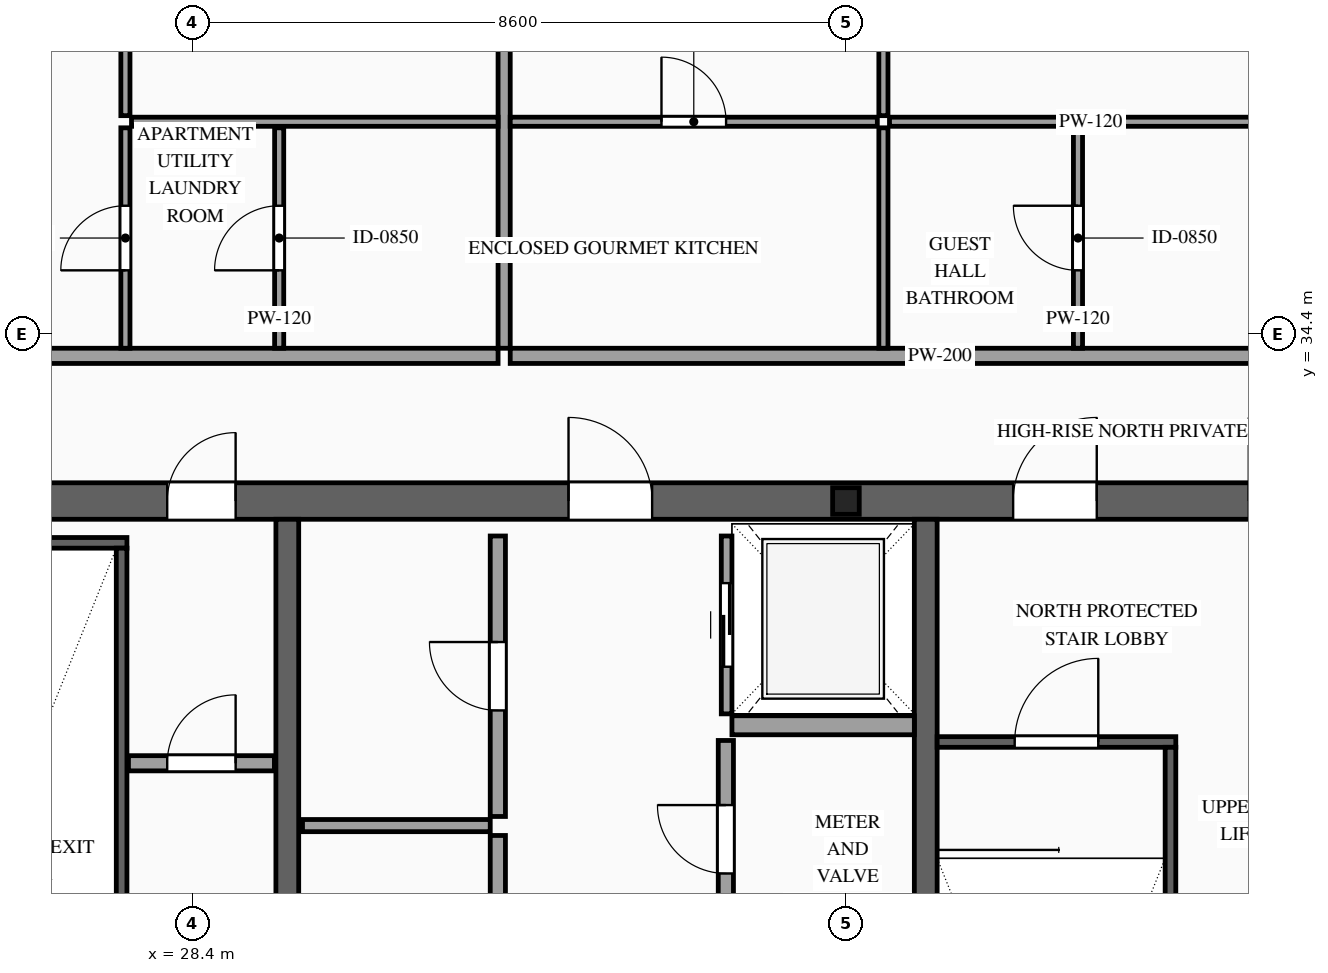
"""IFC4 building model, lengths in metres.
Left out: names, types, materials, properties, quantities, classifications, styles, units other than length and angle.
Written with IfcOpenShell. Run it as: python <this file> out.ifc"""

import sys

from ifc_helpers import new_model, si_unit, direction, frame, frame_2d, origin, origin_2d, place, context, subcontext, project, spatial, rectangle, i_section, extrude, source, transform, mapped, element, fill, save


model = new_model("IFC4")
c1 = context("Model", 3, precision=1e-05, world=origin(), true_north=direction((0.0, 1.0)))
c2 = subcontext(c1, "Body", "Model", "MODEL_VIEW")
j1 = project(units=[si_unit("LENGTHUNIT", "METRE"), si_unit("PLANEANGLEUNIT", "RADIAN")], contexts=[c1])
p1 = place(None, origin())
s1 = spatial("IfcSite", under=j1, at=p1, CompositionType="ELEMENT")
p2 = place(p1, origin())
s2 = spatial("IfcBuilding", under=s1, at=p2, CompositionType="ELEMENT")
p3 = place(p2, frame((0.0, 0.0, 347.2)))
s3 = spatial("IfcBuildingStorey", under=s2, at=p3, CompositionType="ELEMENT", Elevation=347.2)
p4 = place(p3, frame((23.56, 32.2, 0.0), z_axis=(0.0, 0.0, 1.0), x_axis=(1.0, 0.0, 0.0)))
e1 = element("IfcWall", 1, at=p4, inside=s3, PredefinedType="SHEAR", context=c2, shape_type="SweptSolid", body=[
    extrude(rectangle(XDim=26.88, YDim=0.48, at=frame_2d((13.44, 0.0))), origin(), (0.0, 0.0, 1.0), 4.0),
])
p5 = place(p4, frame((4.51, 0.0, 0.0)))
e2 = element("IfcOpeningElement", 2, at=p5, cuts=e1, PredefinedType="OPENING", context=c2, shape_type="SweptSolid", body=[
    extrude(rectangle(XDim=0.9, YDim=2.15, at=frame_2d((0.45, 1.075))), frame((0.0, 0.255, 0.0), z_axis=(0.0, -1.0, 0.0), x_axis=(1.0, 0.0, 0.0)), (0.0, 0.0, 1.0), 0.51),
])
p6 = place(p4, frame((9.79, 0.0, 0.0)))
e3 = element("IfcOpeningElement", 3, at=p6, cuts=e1, PredefinedType="OPENING", context=c2, shape_type="SweptSolid", body=[
    extrude(rectangle(XDim=1.1, YDim=2.2, at=frame_2d((0.55, 1.1))), frame((0.0, 0.255, 0.0), z_axis=(0.0, -1.0, 0.0), x_axis=(1.0, 0.0, 0.0)), (0.0, 0.0, 1.0), 0.51),
])
p7 = place(p4, frame((15.64, 0.0, 0.0)))
e4 = element("IfcOpeningElement", 4, at=p7, cuts=e1, PredefinedType="OPENING", context=c2, shape_type="SweptSolid", body=[
    extrude(rectangle(XDim=1.1, YDim=2.2, at=frame_2d((0.55, 1.1))), frame((0.0, 0.255, 0.0), z_axis=(0.0, -1.0, 0.0), x_axis=(1.0, 0.0, 0.0)), (0.0, 0.0, 1.0), 0.51),
])
p8 = place(p4, frame((18.74, 0.0, 0.0)))
e5 = element("IfcOpeningElement", 5, at=p8, cuts=e1, PredefinedType="OPENING", context=c2, shape_type="SweptSolid", body=[
    extrude(rectangle(XDim=1.1, YDim=2.2, at=frame_2d((0.55, 1.1))), frame((0.0, 0.255, 0.0), z_axis=(0.0, -1.0, 0.0), x_axis=(1.0, 0.0, 0.0)), (0.0, 0.0, 1.0), 0.51),
])
m1 = source(origin(), c2, "Body", "SweptSolid", [
    extrude(rectangle(XDim=12.32, YDim=0.3, at=frame_2d((6.16, 0.0))), origin(), (0.0, 0.0, 1.0), 4.0),
])
for number, where, z_axis, x_axis in (
    (6, (29.65, 19.64, 0.0), (0.0, 0.0, 1.0), (0.0, 1.0, 0.0)),
    (7, (38.05, 19.64, 0.0), (0.0, 0.0, 1.0), (0.0, 1.0, 0.0)),
):
    element("IfcWall", number, at=place(p3, frame(where, z_axis=z_axis, x_axis=x_axis)), inside=s3, PredefinedType="SOLIDWALL", context=c2, shape_type="MappedRepresentation", body=[
        mapped(m1, transform((0.0, 0.0, 0.0), scale=1.0)),
    ])
m2 = source(origin(), c2, "Body", "SweptSolid", [
    extrude(i_section(OverallWidth=0.35, OverallDepth=0.35, WebThickness=0.012, FlangeThickness=0.019, at=origin_2d()), origin(), (0.0, 0.0, 1.0), 4.0),
])
p9 = place(p3, frame((37.0, 32.2, 0.0), z_axis=(0.0, 0.0, 1.0), x_axis=(1.0, 0.0, 0.0)))
e8 = element("IfcColumn", 8, at=p9, inside=s3, PredefinedType="COLUMN", context=c2, shape_type="MappedRepresentation", body=[
    mapped(m2, transform((0.0, 0.0, 0.0), scale=1.0)),
])
p10 = place(p3, frame((35.43, 29.4, 0.0), z_axis=(0.0, 0.0, 1.0), x_axis=(0.0, 1.0, 0.0)))
e9 = element("IfcWall", 9, at=p10, inside=s3, PredefinedType="SOLIDWALL", context=c2, shape_type="SweptSolid", body=[
    extrude(rectangle(XDim=2.34, YDim=0.14, at=frame_2d((1.17, 0.0))), origin(), (0.0, 0.0, 1.0), 3.7),
])
p11 = place(p10, frame((0.62, 0.0, 0.0)))
e10 = element("IfcOpeningElement", 10, at=p11, cuts=e9, PredefinedType="OPENING", context=c2, shape_type="SweptSolid", body=[
    extrude(rectangle(XDim=1.1, YDim=2.2, at=frame_2d((0.55, 1.1))), frame((0.0, 0.085, 0.0), z_axis=(0.0, -1.0, 0.0), x_axis=(1.0, 0.0, 0.0)), (0.0, 0.0, 1.0), 0.17),
])
m3 = source(origin(), c2, "Body", "SweptSolid", [
    extrude(rectangle(XDim=2.4, YDim=0.25, at=frame_2d((1.2, 0.0))), origin(), (0.0, 0.0, 1.0), 3.7),
])
p12 = place(p3, frame((35.5, 29.25, 0.0), z_axis=(0.0, 0.0, 1.0), x_axis=(1.0, 0.0, 0.0)))
e11 = element("IfcWall", 11, at=p12, inside=s3, PredefinedType="SOLIDWALL", context=c2, shape_type="MappedRepresentation", body=[
    mapped(m3, transform((0.0, 0.0, 0.0), scale=1.0)),
])
m4 = source(origin(), c2, "Body", "SweptSolid", [
    extrude(rectangle(XDim=3.28, YDim=0.14, at=frame_2d((1.64, 0.0))), origin(), (0.0, 0.0, 1.0), 3.7),
])
p13 = place(p3, frame((24.26, 31.65, 0.0), z_axis=(0.0, 0.0, 1.0), x_axis=(1.0, 0.0, 0.0)))
e12 = element("IfcWall", 12, at=p13, inside=s3, PredefinedType="SOLIDWALL", context=c2, shape_type="MappedRepresentation", body=[
    mapped(m4, transform((0.0, 0.0, 0.0), scale=1.0)),
])
m5 = source(origin(), c2, "Body", "SweptSolid", [
    extrude(rectangle(XDim=8.94, YDim=0.14, at=frame_2d((4.47, 0.0))), origin(), (0.0, 0.0, 1.0), 3.7),
])
p14 = place(p3, frame((27.47, 22.64, 0.0), z_axis=(0.0, 0.0, 1.0), x_axis=(0.0, 1.0, 0.0)))
e13 = element("IfcWall", 13, at=p14, inside=s3, PredefinedType="SOLIDWALL", context=c2, shape_type="MappedRepresentation", body=[
    mapped(m5, transform((0.0, 0.0, 0.0), scale=1.0)),
])
p15 = place(p3, frame((38.2, 29.03, 0.0), z_axis=(0.0, 0.0, 1.0), x_axis=(1.0, 0.0, 0.0)))
e14 = element("IfcWall", 14, at=p15, inside=s3, PredefinedType="SOLIDWALL", context=c2, shape_type="SweptSolid", body=[
    extrude(rectangle(XDim=3.14, YDim=0.14, at=frame_2d((1.57, 0.0))), origin(), (0.0, 0.0, 1.0), 3.7),
])
p16 = place(p15, frame((1.02, 0.0, 0.0)))
e15 = element("IfcOpeningElement", 15, at=p16, cuts=e14, PredefinedType="OPENING", context=c2, shape_type="SweptSolid", body=[
    extrude(rectangle(XDim=1.1, YDim=2.2, at=frame_2d((0.55, 1.1))), frame((0.0, 0.085, 0.0), z_axis=(0.0, -1.0, 0.0), x_axis=(1.0, 0.0, 0.0)), (0.0, 0.0, 1.0), 0.17),
])
m6 = source(origin(), c2, "Body", "SweptSolid", [
    extrude(rectangle(XDim=8.94, YDim=0.14, at=frame_2d((4.47, 0.0))), origin(), (0.0, 0.0, 1.0), 3.7),
])
p17 = place(p3, frame((41.27, 20.02, 0.0), z_axis=(0.0, 0.0, 1.0), x_axis=(0.0, 1.0, 0.0)))
e16 = element("IfcWall", 16, at=p17, inside=s3, PredefinedType="SOLIDWALL", context=c2, shape_type="MappedRepresentation", body=[
    mapped(m6, transform((0.0, 0.0, 0.0), scale=1.0)),
])
p18 = place(p3, frame((27.56, 28.75, 0.0), z_axis=(0.0, 0.0, 1.0), x_axis=(1.0, 0.0, 0.0)))
e17 = element("IfcWall", 17, at=p18, inside=s3, PredefinedType="PARTITIONING", context=c2, shape_type="SweptSolid", body=[
    extrude(rectangle(XDim=1.92, YDim=0.2, at=frame_2d((0.96, 0.0))), origin(), (0.0, 0.0, 1.0), 3.7),
])
p19 = place(p18, frame((0.51, 0.0, 0.0)))
e18 = element("IfcOpeningElement", 18, at=p19, cuts=e17, PredefinedType="OPENING", context=c2, shape_type="SweptSolid", body=[
    extrude(rectangle(XDim=0.9, YDim=2.15, at=frame_2d((0.45, 1.075))), frame((0.0, 0.115, 0.0), z_axis=(0.0, -1.0, 0.0), x_axis=(1.0, 0.0, 0.0)), (0.0, 0.0, 1.0), 0.23),
])
p20 = place(p3, frame((32.42, 19.86, 0.0), z_axis=(0.0, 0.0, 1.0), x_axis=(0.0, 1.0, 0.0)))
e19 = element("IfcWall", 19, at=p20, inside=s3, PredefinedType="PARTITIONING", context=c2, shape_type="SweptSolid", body=[
    extrude(rectangle(XDim=7.94, YDim=0.2, at=frame_2d((3.97, 0.0))), origin(), (0.0, 0.0, 1.0), 3.7),
])
p21 = place(p20, frame((3.52, 0.0, 0.0)))
e20 = element("IfcOpeningElement", 20, at=p21, cuts=e19, PredefinedType="OPENING", context=c2, shape_type="SweptSolid", body=[
    extrude(rectangle(XDim=0.9, YDim=2.15, at=frame_2d((0.45, 1.075))), frame((0.0, 0.115, 0.0), z_axis=(0.0, -1.0, 0.0), x_axis=(1.0, 0.0, 0.0)), (0.0, 0.0, 1.0), 0.23),
])
p22 = place(p3, frame((32.42, 28.05, 0.0), z_axis=(0.0, 0.0, 1.0), x_axis=(0.0, 1.0, 0.0)))
e21 = element("IfcWall", 21, at=p22, inside=s3, PredefinedType="PARTITIONING", context=c2, shape_type="SweptSolid", body=[
    extrude(rectangle(XDim=3.69, YDim=0.2, at=frame_2d((1.845, 0.0))), origin(), (0.0, 0.0, 1.0), 3.7),
])
p23 = place(p22, frame((1.395, 0.0, 0.0)))
e22 = element("IfcOpeningElement", 22, at=p23, cuts=e21, PredefinedType="OPENING", context=c2, shape_type="SweptSolid", body=[
    extrude(rectangle(XDim=0.9, YDim=2.15, at=frame_2d((0.45, 1.075))), frame((0.0, 0.115, 0.0), z_axis=(0.0, -1.0, 0.0), x_axis=(1.0, 0.0, 0.0)), (0.0, 0.0, 1.0), 0.23),
])
m7 = source(origin(), c2, "Body", "SweptSolid", [
    extrude(rectangle(XDim=2.47, YDim=0.16, at=frame_2d((1.235, 0.0))), origin(), (0.0, 0.0, 1.0), 3.7),
])
p24 = place(p3, frame((29.85, 27.93, 0.0), z_axis=(0.0, 0.0, 1.0), x_axis=(1.0, 0.0, 0.0)))
e23 = element("IfcWall", 23, at=p24, inside=s3, PredefinedType="PARTITIONING", context=c2, shape_type="MappedRepresentation", body=[
    mapped(m7, transform((0.0, 0.0, 0.0), scale=1.0)),
])
p25 = place(p3, frame((35.42, 26.45, 0.0), z_axis=(0.0, 0.0, 1.0), x_axis=(0.0, 1.0, 0.0)))
e24 = element("IfcWall", 24, at=p25, inside=s3, PredefinedType="PARTITIONING", context=c2, shape_type="SweptSolid", body=[
    extrude(rectangle(XDim=2.6, YDim=0.2, at=frame_2d((1.3, 0.0))), origin(), (0.0, 0.0, 1.0), 3.7),
])
p26 = place(p25, frame((0.85, 0.0, 0.0)))
e25 = element("IfcOpeningElement", 25, at=p26, cuts=e24, PredefinedType="OPENING", context=c2, shape_type="SweptSolid", body=[
    extrude(rectangle(XDim=0.9, YDim=2.15, at=frame_2d((0.45, 1.075))), frame((0.0, 0.115, 0.0), z_axis=(0.0, -1.0, 0.0), x_axis=(1.0, 0.0, 0.0)), (0.0, 0.0, 1.0), 0.23),
])
p27 = place(p3, frame((20.94, 34.11, 0.0), z_axis=(0.0, 0.0, 1.0), x_axis=(1.0, 0.0, 0.0)))
e26 = element("IfcWall", 26, at=p27, inside=s3, PredefinedType="PARTITIONING", context=c2, shape_type="SweptSolid", body=[
    extrude(rectangle(XDim=11.483, YDim=0.2, at=frame_2d((5.742, 0.0))), origin(), (0.0, 0.0, 1.0), 3.7),
])
p28 = place(p27, frame((4.552, 0.0, 0.0)))
e27 = element("IfcOpeningElement", 27, at=p28, cuts=e26, PredefinedType="OPENING", context=c2, shape_type="SweptSolid", body=[
    extrude(rectangle(XDim=1.0, YDim=2.2, at=frame_2d((0.5, 1.1))), frame((0.0, 0.115, 0.0), z_axis=(0.0, -1.0, 0.0), x_axis=(1.0, 0.0, 0.0)), (0.0, 0.0, 1.0), 0.23),
])
m8 = source(origin(), c2, "Body", "SweptSolid", [
    extrude(rectangle(XDim=10.54, YDim=0.16, at=frame_2d((5.27, 0.0))), origin(), (0.0, 0.0, 1.0), 3.7),
])
p29 = place(p3, frame((32.503, 34.21, 0.0), z_axis=(0.0, 0.0, 1.0), x_axis=(0.0, 1.0, 0.0)))
e28 = element("IfcWall", 28, at=p29, inside=s3, PredefinedType="PARTITIONING", context=c2, shape_type="MappedRepresentation", body=[
    mapped(m8, transform((0.0, 0.0, 0.0), scale=1.0)),
])
p30 = place(p3, frame((29.543, 34.21, 0.0), z_axis=(0.0, 0.0, 1.0), x_axis=(0.0, 1.0, 0.0)))
e29 = element("IfcWall", 29, at=p30, inside=s3, PredefinedType="PARTITIONING", context=c2, shape_type="SweptSolid", body=[
    extrude(rectangle(XDim=2.9, YDim=0.12, at=frame_2d((1.45, 0.0))), origin(), (0.0, 0.0, 1.0), 3.7),
])
p31 = place(p30, frame((1.025, 0.0, 0.0)))
e30 = element("IfcOpeningElement", 30, at=p31, cuts=e29, PredefinedType="OPENING", context=c2, shape_type="SweptSolid", body=[
    extrude(rectangle(XDim=0.85, YDim=2.1, at=frame_2d((0.425, 1.05))), frame((0.0, 0.075, 0.0), z_axis=(0.0, -1.0, 0.0), x_axis=(1.0, 0.0, 0.0)), (0.0, 0.0, 1.0), 0.15),
])
m9 = source(origin(), c2, "Body", "SweptSolid", [
    extrude(rectangle(XDim=4.823, YDim=0.12, at=frame_2d((2.412, 0.0))), origin(), (0.0, 0.0, 1.0), 3.7),
])
p32 = place(p3, frame((27.6, 37.19, 0.0), z_axis=(0.0, 0.0, 1.0), x_axis=(1.0, 0.0, 0.0)))
e31 = element("IfcWall", 31, at=p32, inside=s3, PredefinedType="PARTITIONING", context=c2, shape_type="MappedRepresentation", body=[
    mapped(m9, transform((0.0, 0.0, 0.0), scale=1.0)),
])
p33 = place(p3, frame((27.52, 37.27, 0.0), z_axis=(0.0, 0.0, 1.0), x_axis=(0.0, 1.0, 0.0)))
e32 = element("IfcWall", 32, at=p33, inside=s3, PredefinedType="PARTITIONING", context=c2, shape_type="SweptSolid", body=[
    extrude(rectangle(XDim=7.48, YDim=0.12, at=frame_2d((3.74, 0.0))), origin(), (0.0, 0.0, 1.0), 3.7),
])
p34 = place(p33, frame((3.29, 0.0, 0.0)))
e33 = element("IfcOpeningElement", 33, at=p34, cuts=e32, PredefinedType="OPENING", context=c2, shape_type="SweptSolid", body=[
    extrude(rectangle(XDim=0.9, YDim=2.15, at=frame_2d((0.45, 1.075))), frame((0.0, 0.075, 0.0), z_axis=(0.0, -1.0, 0.0), x_axis=(1.0, 0.0, 0.0)), (0.0, 0.0, 1.0), 0.15),
])
p35 = place(p3, frame((27.52, 34.21, 0.0), z_axis=(0.0, 0.0, 1.0), x_axis=(0.0, 1.0, 0.0)))
e34 = element("IfcWall", 34, at=p35, inside=s3, PredefinedType="PARTITIONING", context=c2, shape_type="SweptSolid", body=[
    extrude(rectangle(XDim=2.9, YDim=0.12, at=frame_2d((1.45, 0.0))), origin(), (0.0, 0.0, 1.0), 3.7),
])
p36 = place(p35, frame((1.025, 0.0, 0.0)))
e35 = element("IfcOpeningElement", 35, at=p36, cuts=e34, PredefinedType="OPENING", context=c2, shape_type="SweptSolid", body=[
    extrude(rectangle(XDim=0.85, YDim=2.1, at=frame_2d((0.425, 1.05))), frame((0.0, 0.075, 0.0), z_axis=(0.0, -1.0, 0.0), x_axis=(1.0, 0.0, 0.0)), (0.0, 0.0, 1.0), 0.15),
])
p37 = place(p3, frame((32.583, 34.11, 0.0), z_axis=(0.0, 0.0, 1.0), x_axis=(1.0, 0.0, 0.0)))
e36 = element("IfcWall", 36, at=p37, inside=s3, PredefinedType="PARTITIONING", context=c2, shape_type="SweptSolid", body=[
    extrude(rectangle(XDim=20.477, YDim=0.2, at=frame_2d((10.239, 0.0))), origin(), (0.0, 0.0, 1.0), 3.7),
])
p38 = place(p37, frame((11.557, 0.0, 0.0)))
e37 = element("IfcOpeningElement", 37, at=p38, cuts=e36, PredefinedType="OPENING", context=c2, shape_type="SweptSolid", body=[
    extrude(rectangle(XDim=1.0, YDim=2.2, at=frame_2d((0.5, 1.1))), frame((0.0, 0.115, 0.0), z_axis=(0.0, -1.0, 0.0), x_axis=(1.0, 0.0, 0.0)), (0.0, 0.0, 1.0), 0.23),
])
p39 = place(p3, frame((32.583, 37.19, 0.0), z_axis=(0.0, 0.0, 1.0), x_axis=(1.0, 0.0, 0.0)))
e38 = element("IfcWall", 38, at=p39, inside=s3, PredefinedType="PARTITIONING", context=c2, shape_type="SweptSolid", body=[
    extrude(rectangle(XDim=4.83, YDim=0.12, at=frame_2d((2.415, 0.0))), origin(), (0.0, 0.0, 1.0), 3.7),
])
p40 = place(p39, frame((1.99, 0.0, 0.0)))
e39 = element("IfcOpeningElement", 39, at=p40, cuts=e38, PredefinedType="OPENING", context=c2, shape_type="SweptSolid", body=[
    extrude(rectangle(XDim=0.85, YDim=2.1, at=frame_2d((0.425, 1.05))), frame((0.0, 0.075, 0.0), z_axis=(0.0, -1.0, 0.0), x_axis=(1.0, 0.0, 0.0)), (0.0, 0.0, 1.0), 0.15),
])
m10 = source(origin(), c2, "Body", "SweptSolid", [
    extrude(rectangle(XDim=2.9, YDim=0.12, at=frame_2d((1.45, 0.0))), origin(), (0.0, 0.0, 1.0), 3.7),
])
p41 = place(p3, frame((37.493, 34.21, 0.0), z_axis=(0.0, 0.0, 1.0), x_axis=(0.0, 1.0, 0.0)))
e40 = element("IfcWall", 40, at=p41, inside=s3, PredefinedType="PARTITIONING", context=c2, shape_type="MappedRepresentation", body=[
    mapped(m10, transform((0.0, 0.0, 0.0), scale=1.0)),
])
p42 = place(p3, frame((40.053, 34.21, 0.0), z_axis=(0.0, 0.0, 1.0), x_axis=(0.0, 1.0, 0.0)))
e41 = element("IfcWall", 41, at=p42, inside=s3, PredefinedType="PARTITIONING", context=c2, shape_type="SweptSolid", body=[
    extrude(rectangle(XDim=2.9, YDim=0.12, at=frame_2d((1.45, 0.0))), origin(), (0.0, 0.0, 1.0), 3.7),
])
p43 = place(p42, frame((1.025, 0.0, 0.0)))
e42 = element("IfcOpeningElement", 42, at=p43, cuts=e41, PredefinedType="OPENING", context=c2, shape_type="SweptSolid", body=[
    extrude(rectangle(XDim=0.85, YDim=2.1, at=frame_2d((0.425, 1.05))), frame((0.0, 0.075, 0.0), z_axis=(0.0, -1.0, 0.0), x_axis=(1.0, 0.0, 0.0)), (0.0, 0.0, 1.0), 0.15),
])
p44 = place(p3, frame((37.493, 37.27, 0.0), z_axis=(0.0, 0.0, 1.0), x_axis=(0.0, 1.0, 0.0)))
e43 = element("IfcWall", 43, at=p44, inside=s3, PredefinedType="PARTITIONING", context=c2, shape_type="SweptSolid", body=[
    extrude(rectangle(XDim=7.48, YDim=0.12, at=frame_2d((3.74, 0.0))), origin(), (0.0, 0.0, 1.0), 3.7),
])
p45 = place(p44, frame((3.29, 0.0, 0.0)))
e44 = element("IfcOpeningElement", 44, at=p45, cuts=e43, PredefinedType="OPENING", context=c2, shape_type="SweptSolid", body=[
    extrude(rectangle(XDim=0.9, YDim=2.15, at=frame_2d((0.45, 1.075))), frame((0.0, 0.075, 0.0), z_axis=(0.0, -1.0, 0.0), x_axis=(1.0, 0.0, 0.0)), (0.0, 0.0, 1.0), 0.15),
])
m11 = source(origin(), c2, "Body", "SweptSolid", [
    extrude(rectangle(XDim=5.297, YDim=0.12, at=frame_2d((2.648, 0.0))), origin(), (0.0, 0.0, 1.0), 3.7),
])
p46 = place(p3, frame((37.573, 37.19, 0.0), z_axis=(0.0, 0.0, 1.0), x_axis=(1.0, 0.0, 0.0)))
e45 = element("IfcWall", 45, at=p46, inside=s3, PredefinedType="PARTITIONING", context=c2, shape_type="MappedRepresentation", body=[
    mapped(m11, transform((0.0, 0.0, 0.0), scale=1.0)),
])
m12 = source(origin(), c2, "Body", "SweptSolid", [
    extrude(rectangle(XDim=1.1, YDim=2.2, at=frame_2d((0.55, 1.1))), frame((0.0, 0.025, 0.0), z_axis=(0.0, -1.0, 0.0), x_axis=(1.0, 0.0, 0.0)), (0.0, 0.0, 1.0), 0.05),
])
p47 = place(p11, origin())
e46 = element("IfcDoor", 46, at=p47, inside=s3, OperationType="SLIDING_TO_RIGHT", PredefinedType="DOOR", context=c2, shape_type="MappedRepresentation", body=[
    mapped(m12, transform((0.0, 0.0, 0.0), scale=1.0)),
])
fill(e10, e46)
m13 = source(origin(), c2, "Body", "SweptSolid", [
    extrude(rectangle(XDim=1.1, YDim=2.2, at=frame_2d((0.55, 1.1))), frame((0.0, 0.025, 0.0), z_axis=(0.0, -1.0, 0.0), x_axis=(1.0, 0.0, 0.0)), (0.0, 0.0, 1.0), 0.05),
])
p48 = place(p16, origin())
e47 = element("IfcDoor", 47, at=p48, inside=s3, OperationType="SINGLE_SWING_RIGHT", PredefinedType="DOOR", context=c2, shape_type="MappedRepresentation", body=[
    mapped(m13, transform((0.0, 0.0, 0.0), scale=1.0)),
])
fill(e15, e47)
m14 = source(origin(), c2, "Body", "SweptSolid", [
    extrude(rectangle(XDim=0.9, YDim=2.15, at=frame_2d((0.45, 1.075))), frame((0.0, 0.025, 0.0), z_axis=(0.0, -1.0, 0.0), x_axis=(1.0, 0.0, 0.0)), (0.0, 0.0, 1.0), 0.05),
])
p49 = place(p5, origin())
e48 = element("IfcDoor", 48, at=p49, inside=s3, OperationType="SINGLE_SWING_RIGHT", PredefinedType="DOOR", context=c2, shape_type="MappedRepresentation", body=[
    mapped(m14, transform((0.0, 0.0, 0.0), scale=1.0)),
])
fill(e2, e48)
p50 = place(p6, origin())
e49 = element("IfcDoor", 49, at=p50, inside=s3, OperationType="SINGLE_SWING_LEFT", PredefinedType="DOOR", context=c2, shape_type="MappedRepresentation", body=[
    mapped(m13, transform((0.0, 0.0, 0.0), scale=1.0)),
])
fill(e3, e49)
p51 = place(p7, origin())
e50 = element("IfcDoor", 50, at=p51, inside=s3, OperationType="SINGLE_SWING_RIGHT", PredefinedType="DOOR", context=c2, shape_type="MappedRepresentation", body=[
    mapped(m13, transform((0.0, 0.0, 0.0), scale=1.0)),
])
fill(e4, e50)
p52 = place(p19, origin())
e51 = element("IfcDoor", 51, at=p52, inside=s3, OperationType="SINGLE_SWING_RIGHT", PredefinedType="DOOR", context=c2, shape_type="MappedRepresentation", body=[
    mapped(m14, transform((0.0, 0.0, 0.0), scale=1.0)),
])
fill(e18, e51)
p53 = place(p23, origin())
e52 = element("IfcDoor", 52, at=p53, inside=s3, OperationType="SINGLE_SWING_RIGHT", PredefinedType="DOOR", context=c2, shape_type="MappedRepresentation", body=[
    mapped(m14, transform((0.0, 0.0, 0.0), scale=1.0)),
])
fill(e22, e52)
p54 = place(p26, origin())
e53 = element("IfcDoor", 53, at=p54, inside=s3, OperationType="SINGLE_SWING_RIGHT", PredefinedType="DOOR", context=c2, shape_type="MappedRepresentation", body=[
    mapped(m14, transform((0.0, 0.0, 0.0), scale=1.0)),
])
fill(e25, e53)
m15 = source(origin(), c2, "Body", "SweptSolid", [
    extrude(rectangle(XDim=0.85, YDim=2.1, at=frame_2d((0.425, 1.05))), frame((0.0, 0.025, 0.0), z_axis=(0.0, -1.0, 0.0), x_axis=(1.0, 0.0, 0.0)), (0.0, 0.0, 1.0), 0.05),
])
p55 = place(p31, origin())
e54 = element("IfcDoor", 54, at=p55, inside=s3, OperationType="SINGLE_SWING_LEFT", PredefinedType="DOOR", context=c2, shape_type="MappedRepresentation", body=[
    mapped(m15, transform((0.0, 0.0, 0.0), scale=1.0)),
])
fill(e30, e54)
p56 = place(p36, origin())
e55 = element("IfcDoor", 55, at=p56, inside=s3, OperationType="SINGLE_SWING_LEFT", PredefinedType="DOOR", context=c2, shape_type="MappedRepresentation", body=[
    mapped(m15, transform((0.0, 0.0, 0.0), scale=1.0)),
])
fill(e35, e55)
p57 = place(p40, origin())
e56 = element("IfcDoor", 56, at=p57, inside=s3, OperationType="SINGLE_SWING_LEFT", PredefinedType="DOOR", context=c2, shape_type="MappedRepresentation", body=[
    mapped(m15, transform((0.0, 0.0, 0.0), scale=1.0)),
])
fill(e39, e56)
p58 = place(p43, origin())
e57 = element("IfcDoor", 57, at=p58, inside=s3, OperationType="SINGLE_SWING_RIGHT", PredefinedType="DOOR", context=c2, shape_type="MappedRepresentation", body=[
    mapped(m15, transform((0.0, 0.0, 0.0), scale=1.0)),
])
fill(e42, e57)
save(model, sys.argv[1])
